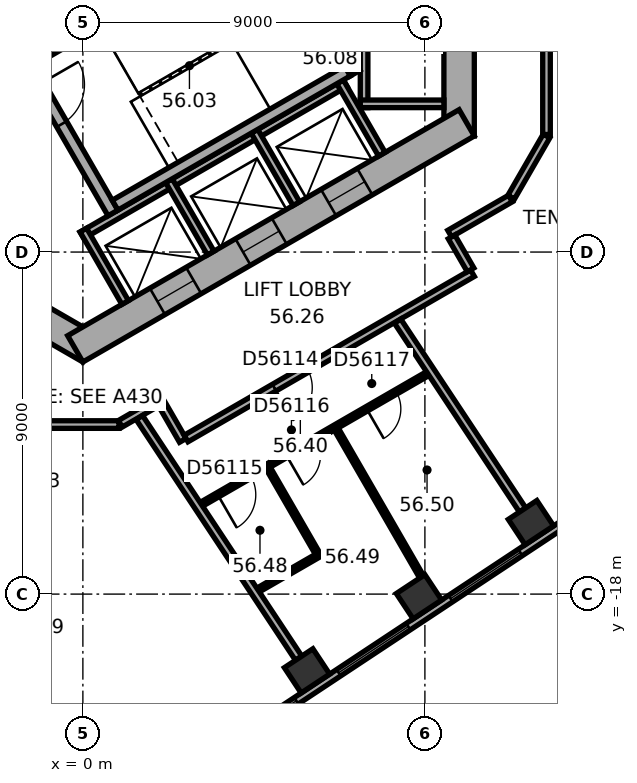
"""IFC4 building model, lengths in metres.
Left out: names, types, materials, properties, quantities, classifications, styles, units other than length and angle.
Written with IfcOpenShell. Run it as: python <this file> out.ifc"""

import sys

from ifc_helpers import new_model, si_unit, direction, frame, frame_2d, origin, origin_2d, place, context, subcontext, project, spatial, rectangle, extrude, element, fill, save


model = new_model("IFC4")
c1 = context("Model", 3, precision=1e-05, world=origin(), true_north=direction((0.0, 1.0)))
c2 = subcontext(c1, "Body", "Model", "MODEL_VIEW")
j1 = project(units=[si_unit("LENGTHUNIT", "METRE"), si_unit("PLANEANGLEUNIT", "RADIAN")], contexts=[c1])
p1 = place(None, origin())
s1 = spatial("IfcSite", under=j1, at=p1, CompositionType="ELEMENT")
p2 = place(p1, origin())
s2 = spatial("IfcBuilding", under=s1, at=p2, CompositionType="ELEMENT")
p3 = place(p2, frame((0.0, 0.0, 229.1)))
s3 = spatial("IfcBuildingStorey", under=s2, at=p3, CompositionType="ELEMENT", Elevation=229.1)
for number, where, z_axis, x_axis in (
    (1, (5.898, -20.021, 0.0), (0.0, 0.0, 1.0), (0.834, 0.552, 0.0)),
    (2, (8.844, -18.07, 0.0), (0.0, 0.0, 1.0), (0.834, 0.552, 0.0)),
    (3, (11.791, -16.12, 0.0), (0.0, 0.0, 1.0), (0.834, 0.552, 0.0)),
):
    element("IfcColumn", number, at=place(p3, frame(where, z_axis=z_axis, x_axis=x_axis)), inside=s3, PredefinedType="COLUMN", context=c2, shape_type="SweptSolid", body=[
        extrude(rectangle(XDim=0.9, YDim=0.8, at=origin_2d()), origin(), (0.0, 0.0, 1.0), 3.7),
    ])
p4 = place(p3, frame((9.9, -5.947, 0.0), z_axis=(0.0, 0.0, 1.0), x_axis=(0.0, 1.0, 0.0)))
e4 = element("IfcWall", 4, at=p4, inside=s3, PredefinedType="SHEAR", context=c2, shape_type="SweptSolid", body=[
    extrude(rectangle(XDim=11.894, YDim=0.8, at=frame_2d((5.947, 0.0))), origin(), (0.0, 0.0, 1.0), 3.7),
])
p5 = place(p4, frame((6.147, 0.0, 0.0)))
e5 = element("IfcOpeningElement", 5, at=p5, cuts=e4, PredefinedType="OPENING", context=c2, shape_type="SweptSolid", body=[
    extrude(rectangle(XDim=1.5, YDim=2.1, at=frame_2d((0.75, 1.05))), frame((0.0, 0.41, 0.0), z_axis=(0.0, -1.0, 0.0), x_axis=(1.0, 0.0, 0.0)), (0.0, 0.0, 1.0), 0.82),
])
p6 = place(p4, frame((2.997, 0.0, 0.0)))
e6 = element("IfcOpeningElement", 6, at=p6, cuts=e4, PredefinedType="OPENING", context=c2, shape_type="SweptSolid", body=[
    extrude(rectangle(XDim=0.9, YDim=2.1, at=frame_2d((0.45, 1.05))), frame((0.0, 0.41, 0.0), z_axis=(0.0, -1.0, 0.0), x_axis=(1.0, 0.0, 0.0)), (0.0, 0.0, 1.0), 0.82),
])
p7 = place(p3, frame((-10.1, -5.6, 0.0), z_axis=(0.0, 0.0, 1.0), x_axis=(0.866023897231, -0.500002609418, 0.0)))
e7 = element("IfcWall", 7, at=p7, inside=s3, PredefinedType="SHEAR", context=c2, shape_type="SweptSolid", body=[
    extrude(rectangle(XDim=11.894, YDim=0.8, at=frame_2d((5.947, 0.0))), origin(), (0.0, 0.0, 1.0), 3.7),
])
p8 = place(p7, frame((6.147, 0.0, 0.0)))
e8 = element("IfcOpeningElement", 8, at=p8, cuts=e7, PredefinedType="OPENING", context=c2, shape_type="SweptSolid", body=[
    extrude(rectangle(XDim=1.5, YDim=2.1, at=frame_2d((0.75, 1.05))), frame((0.0, 0.41, 0.0), z_axis=(0.0, -1.0, 0.0), x_axis=(1.0, 0.0, 0.0)), (0.0, 0.0, 1.0), 0.82),
])
p9 = place(p7, frame((1.597, 0.0, 0.0)))
e9 = element("IfcOpeningElement", 9, at=p9, cuts=e7, PredefinedType="OPENING", context=c2, shape_type="SweptSolid", body=[
    extrude(rectangle(XDim=1.1, YDim=2.1, at=frame_2d((0.55, 1.05))), frame((0.0, 0.41, 0.0), z_axis=(0.0, -1.0, 0.0), x_axis=(1.0, 0.0, 0.0)), (0.0, 0.0, 1.0), 0.82),
])
p10 = place(p7, frame((4.197, 0.0, 0.0)))
e10 = element("IfcOpeningElement", 10, at=p10, cuts=e7, PredefinedType="OPENING", context=c2, shape_type="SweptSolid", body=[
    extrude(rectangle(XDim=1.1, YDim=2.1, at=frame_2d((0.55, 1.05))), frame((0.0, 0.41, 0.0), z_axis=(0.0, -1.0, 0.0), x_axis=(1.0, 0.0, 0.0)), (0.0, 0.0, 1.0), 0.82),
])
p11 = place(p3, frame((-0.2, -11.547, 0.0), z_axis=(0.0, 0.0, 1.0), x_axis=(0.866023897231, 0.500002609418, 0.0)))
e11 = element("IfcWall", 11, at=p11, inside=s3, PredefinedType="SHEAR", context=c2, shape_type="SweptSolid", body=[
    extrude(rectangle(XDim=11.894, YDim=0.8, at=frame_2d((5.947, 0.0))), origin(), (0.0, 0.0, 1.0), 3.7),
])
p12 = place(p11, frame((2.497, 0.0, 0.0)))
e12 = element("IfcOpeningElement", 12, at=p12, cuts=e11, PredefinedType="OPENING", context=c2, shape_type="SweptSolid", body=[
    extrude(rectangle(XDim=1.1, YDim=2.1, at=frame_2d((0.55, 1.05))), frame((0.0, 0.41, 0.0), z_axis=(0.0, -1.0, 0.0), x_axis=(1.0, 0.0, 0.0)), (0.0, 0.0, 1.0), 0.82),
])
p13 = place(p11, frame((5.097, 0.0, 0.0)))
e13 = element("IfcOpeningElement", 13, at=p13, cuts=e11, PredefinedType="OPENING", context=c2, shape_type="SweptSolid", body=[
    extrude(rectangle(XDim=1.1, YDim=2.1, at=frame_2d((0.55, 1.05))), frame((0.0, 0.41, 0.0), z_axis=(0.0, -1.0, 0.0), x_axis=(1.0, 0.0, 0.0)), (0.0, 0.0, 1.0), 0.82),
])
p14 = place(p11, frame((7.697, 0.0, 0.0)))
e14 = element("IfcOpeningElement", 14, at=p14, cuts=e11, PredefinedType="OPENING", context=c2, shape_type="SweptSolid", body=[
    extrude(rectangle(XDim=1.1, YDim=2.1, at=frame_2d((0.55, 1.05))), frame((0.0, 0.41, 0.0), z_axis=(0.0, -1.0, 0.0), x_axis=(1.0, 0.0, 0.0)), (0.0, 0.0, 1.0), 0.82),
])
p15 = place(p3, frame((2.739, -22.711, 0.0), z_axis=(0.0, 0.0, 1.0), x_axis=(0.833885723098, 0.551937134838, 0.0)))
e15 = element("IfcWall", 15, at=p15, inside=s3, PredefinedType="STANDARD", context=c2, shape_type="SweptSolid", body=[
    extrude(rectangle(XDim=18.841, YDim=0.2, at=frame_2d((9.421, 0.0))), origin(), (0.0, 0.0, 1.0), 3.7),
])
p16 = place(p15, frame((1.252, 0.0, 0.9)))
e16 = element("IfcOpeningElement", 16, at=p16, cuts=e15, PredefinedType="OPENING", context=c2, shape_type="SweptSolid", body=[
    extrude(rectangle(XDim=2.2, YDim=2.0, at=frame_2d((1.1, 1.0))), frame((0.0, 0.11, 0.0), z_axis=(0.0, -1.0, 0.0), x_axis=(1.0, 0.0, 0.0)), (0.0, 0.0, 1.0), 0.22),
])
p17 = place(p15, frame((4.786, 0.0, 0.9)))
e17 = element("IfcOpeningElement", 17, at=p17, cuts=e15, PredefinedType="OPENING", context=c2, shape_type="SweptSolid", body=[
    extrude(rectangle(XDim=2.2, YDim=2.0, at=frame_2d((1.1, 1.0))), frame((0.0, 0.11, 0.0), z_axis=(0.0, -1.0, 0.0), x_axis=(1.0, 0.0, 0.0)), (0.0, 0.0, 1.0), 0.22),
])
p18 = place(p15, frame((8.32, 0.0, 0.9)))
e18 = element("IfcOpeningElement", 18, at=p18, cuts=e15, PredefinedType="OPENING", context=c2, shape_type="SweptSolid", body=[
    extrude(rectangle(XDim=2.2, YDim=2.0, at=frame_2d((1.1, 1.0))), frame((0.0, 0.11, 0.0), z_axis=(0.0, -1.0, 0.0), x_axis=(1.0, 0.0, 0.0)), (0.0, 0.0, 1.0), 0.22),
])
p19 = place(p15, frame((11.854, 0.0, 0.9)))
e19 = element("IfcOpeningElement", 19, at=p19, cuts=e15, PredefinedType="OPENING", context=c2, shape_type="SweptSolid", body=[
    extrude(rectangle(XDim=2.2, YDim=2.0, at=frame_2d((1.1, 1.0))), frame((0.0, 0.11, 0.0), z_axis=(0.0, -1.0, 0.0), x_axis=(1.0, 0.0, 0.0)), (0.0, 0.0, 1.0), 0.22),
])
p20 = place(p15, frame((15.387, 0.0, 0.9)))
e20 = element("IfcOpeningElement", 20, at=p20, cuts=e15, PredefinedType="OPENING", context=c2, shape_type="SweptSolid", body=[
    extrude(rectangle(XDim=2.2, YDim=2.0, at=frame_2d((1.1, 1.0))), frame((0.0, 0.11, 0.0), z_axis=(0.0, -1.0, 0.0), x_axis=(1.0, 0.0, 0.0)), (0.0, 0.0, 1.0), 0.22),
])
p21 = place(p3, frame((7.4, -5.2, 0.0), z_axis=(0.0, 0.0, 1.0), x_axis=(0.0, 1.0, 0.0)))
e21 = element("IfcWall", 21, at=p21, inside=s3, PredefinedType="PARTITIONING", context=c2, shape_type="SweptSolid", body=[
    extrude(rectangle(XDim=5.4, YDim=0.2, at=frame_2d((2.7, 0.0))), origin(), (0.0, 0.0, 1.0), 3.42),
])
p22 = place(p3, frame((7.3, -5.1, 0.0), z_axis=(0.0, 0.0, 1.0), x_axis=(1.0, 0.0, 0.0)))
e22 = element("IfcWall", 22, at=p22, inside=s3, PredefinedType="PARTITIONING", context=c2, shape_type="SweptSolid", body=[
    extrude(rectangle(XDim=2.2, YDim=0.2, at=frame_2d((1.1, 0.0))), origin(), (0.0, 0.0, 1.0), 3.42),
])
p23 = place(p3, frame((-0.024, -8.559, 0.0), z_axis=(0.0, 0.0, 1.0), x_axis=(0.866026010844, 0.49999894854, 0.0)))
e23 = element("IfcWall", 23, at=p23, inside=s3, PredefinedType="PARTITIONING", context=c2, shape_type="SweptSolid", body=[
    extrude(rectangle(XDim=8.0, YDim=0.2, at=frame_2d((4.0, 0.0))), origin(), (0.0, 0.0, 1.0), 3.42),
])
for number, where, z_axis, x_axis in (
    (24, (0.013, -8.422, 0.0), (0.0, 0.0, 1.0), (0.5, -0.866, 0.0)),
    (25, (2.264, -7.122, 0.0), (0.0, 0.0, 1.0), (0.5, -0.866, 0.0)),
    (26, (4.516, -5.822, 0.0), (0.0, 0.0, 1.0), (0.5, -0.866, 0.0)),
    (27, (6.768, -4.522, 0.0), (0.0, 0.0, 1.0), (0.5, -0.866, 0.0)),
):
    element("IfcWall", number, at=place(p3, frame(where, z_axis=z_axis, x_axis=x_axis)), inside=s3, PredefinedType="PARTITIONING", context=c2, shape_type="SweptSolid", body=[
        extrude(rectangle(XDim=2.2, YDim=0.2, at=frame_2d((1.1, 0.0))), origin(), (0.0, 0.0, 1.0), 3.42),
    ])
p24 = place(p3, frame((-1.558, -3.902, 0.0), z_axis=(0.0, 0.0, 1.0), x_axis=(0.499977259774, -0.866038532462, 0.0)))
e28 = element("IfcWall", 28, at=p24, inside=s3, PredefinedType="SHEAR", context=c2, shape_type="SweptSolid", body=[
    extrude(rectangle(XDim=4.7, YDim=0.3, at=frame_2d((2.35, 0.0))), origin(), (0.0, 0.0, 1.0), 3.42),
])
p25 = place(p24, frame((0.8, 0.0, 0.0)))
e29 = element("IfcOpeningElement", 29, at=p25, cuts=e28, PredefinedType="OPENING", context=c2, shape_type="SweptSolid", body=[
    extrude(rectangle(XDim=1.2, YDim=2.1, at=frame_2d((0.6, 1.05))), frame((0.0, 0.16, 0.0), z_axis=(0.0, -1.0, 0.0), x_axis=(1.0, 0.0, 0.0)), (0.0, 0.0, 1.0), 0.32),
])
p26 = place(p3, frame((4.816, -0.222, 0.0), z_axis=(0.0, 0.0, 1.0), x_axis=(0.499977259774, -0.866038532462, 0.0)))
e30 = element("IfcWall", 30, at=p26, inside=s3, PredefinedType="SHEAR", context=c2, shape_type="SweptSolid", body=[
    extrude(rectangle(XDim=4.7, YDim=0.3, at=frame_2d((2.35, 0.0))), origin(), (0.0, 0.0, 1.0), 3.42),
])
for number, where, z_axis, x_axis in (
    (31, (-1.353, -3.957, 0.0), (0.0, 0.0, 1.0), (0.866, 0.5, 0.0)),
    (32, (0.847, -7.767, 0.0), (0.0, 0.0, 1.0), (0.866, 0.5, 0.0)),
):
    element("IfcWall", number, at=place(p3, frame(where, z_axis=z_axis, x_axis=x_axis)), inside=s3, PredefinedType="SHEAR", context=c2, shape_type="SweptSolid", body=[
        extrude(rectangle(XDim=7.06, YDim=0.3, at=frame_2d((3.53, 0.0))), origin(), (0.0, 0.0, 1.0), 3.42),
    ])
p27 = place(p3, frame((-0.95, -13.539, 0.0), z_axis=(0.0, 0.0, 1.0), x_axis=(1.0, 0.0, 0.0)))
e33 = element("IfcWall", 33, at=p27, inside=s3, PredefinedType="PARTITIONING", context=c2, shape_type="SweptSolid", body=[
    extrude(rectangle(XDim=1.9, YDim=0.2, at=frame_2d((0.95, 0.0))), origin(), (0.0, 0.0, 1.0), 3.42),
])
p28 = place(p3, frame((0.985, -13.519, 0.0), z_axis=(0.0, 0.0, 1.0), x_axis=(0.866054082991, 0.499950322867, 0.0)))
e34 = element("IfcWall", 34, at=p28, inside=s3, PredefinedType="PARTITIONING", context=c2, shape_type="SweptSolid", body=[
    extrude(rectangle(XDim=1.206, YDim=0.2, at=frame_2d((0.603, 0.0))), origin(), (0.0, 0.0, 1.0), 3.42),
])
p29 = place(p3, frame((2.079, -13.003, 0.0), z_axis=(0.0, 0.0, 1.0), x_axis=(0.500074377092, -0.865982457891, 0.0)))
e35 = element("IfcWall", 35, at=p29, inside=s3, PredefinedType="PARTITIONING", context=c2, shape_type="SweptSolid", body=[
    extrude(rectangle(XDim=1.101, YDim=0.2, at=frame_2d((0.55, 0.0))), origin(), (0.0, 0.0, 1.0), 3.42),
])
p30 = place(p3, frame((2.716, -13.906, 0.0), z_axis=(0.0, 0.0, 1.0), x_axis=(0.866040290674, 0.499974214264, 0.0)))
e36 = element("IfcWall", 36, at=p30, inside=s3, PredefinedType="PARTITIONING", context=c2, shape_type="SweptSolid", body=[
    extrude(rectangle(XDim=8.702, YDim=0.2, at=frame_2d((4.351, 0.0))), origin(), (0.0, 0.0, 1.0), 3.42),
])
p31 = place(p30, frame((2.679, 0.0, 0.0)))
e37 = element("IfcOpeningElement", 37, at=p31, cuts=e36, PredefinedType="OPENING", context=c2, shape_type="SweptSolid", body=[
    extrude(rectangle(XDim=1.0, YDim=2.1, at=frame_2d((0.5, 1.05))), frame((0.0, 0.11, 0.0), z_axis=(0.0, -1.0, 0.0), x_axis=(1.0, 0.0, 0.0)), (0.0, 0.0, 1.0), 0.22),
])
p32 = place(p3, frame((3.117, -15.638, 0.0), z_axis=(0.0, 0.0, 1.0), x_axis=(0.866031365477, 0.499989673903, 0.0)))
e38 = element("IfcWall", 38, at=p32, inside=s3, PredefinedType="PARTITIONING", context=c2, shape_type="SweptSolid", body=[
    extrude(rectangle(XDim=6.881, YDim=0.12, at=frame_2d((3.44, 0.0))), origin(), (0.0, 0.0, 1.0), 3.42),
])
p33 = place(p32, frame((0.5, 0.0, 0.0)))
e39 = element("IfcOpeningElement", 39, at=p33, cuts=e38, PredefinedType="OPENING", context=c2, shape_type="SweptSolid", body=[
    extrude(rectangle(XDim=1.0, YDim=2.1, at=frame_2d((0.5, 1.05))), frame((0.0, 0.07, 0.0), z_axis=(0.0, -1.0, 0.0), x_axis=(1.0, 0.0, 0.0)), (0.0, 0.0, 1.0), 0.14),
])
p34 = place(p32, frame((2.583, 0.0, 0.0)))
e40 = element("IfcOpeningElement", 40, at=p34, cuts=e38, PredefinedType="OPENING", context=c2, shape_type="SweptSolid", body=[
    extrude(rectangle(XDim=0.9, YDim=2.1, at=frame_2d((0.45, 1.05))), frame((0.0, 0.07, 0.0), z_axis=(0.0, -1.0, 0.0), x_axis=(1.0, 0.0, 0.0)), (0.0, 0.0, 1.0), 0.14),
])
p35 = place(p32, frame((5.023, 0.0, 0.0)))
e41 = element("IfcOpeningElement", 41, at=p35, cuts=e38, PredefinedType="OPENING", context=c2, shape_type="SweptSolid", body=[
    extrude(rectangle(XDim=0.9, YDim=2.1, at=frame_2d((0.45, 1.05))), frame((0.0, 0.07, 0.0), z_axis=(0.0, -1.0, 0.0), x_axis=(1.0, 0.0, 0.0)), (0.0, 0.0, 1.0), 0.14),
])
p36 = place(p3, frame((4.61, -17.893, 0.0), z_axis=(0.0, 0.0, 1.0), x_axis=(0.866023842607, 0.500002704028, 0.0)))
e42 = element("IfcWall", 42, at=p36, inside=s3, PredefinedType="PARTITIONING", context=c2, shape_type="SweptSolid", body=[
    extrude(rectangle(XDim=1.835, YDim=0.12, at=frame_2d((0.917, 0.0))), origin(), (0.0, 0.0, 1.0), 3.42),
])
p37 = place(p3, frame((5.677, -19.687, 0.0), z_axis=(0.0, 0.0, 1.0), x_axis=(-0.551936619203, 0.833886064389, 0.0)))
e43 = element("IfcWall", 43, at=p37, inside=s3, PredefinedType="PARTITIONING", context=c2, shape_type="SweptSolid", body=[
    extrude(rectangle(XDim=7.592, YDim=0.2, at=frame_2d((3.796, 0.0))), origin(), (0.0, 0.0, 1.0), 3.42),
])
p38 = place(p3, frame((6.169, -16.924, 0.0), z_axis=(0.0, 0.0, 1.0), x_axis=(-0.500047388771, 0.865998042136, 0.0)))
e44 = element("IfcWall", 44, at=p38, inside=s3, PredefinedType="PARTITIONING", context=c2, shape_type="SweptSolid", body=[
    extrude(rectangle(XDim=2.58, YDim=0.12, at=frame_2d((1.29, 0.0))), origin(), (0.0, 0.0, 1.0), 3.42),
])
p39 = place(p3, frame((8.912, -17.545, 0.0), z_axis=(0.0, 0.0, 1.0), x_axis=(-0.500022113525, 0.866012636158, 0.0)))
e45 = element("IfcWall", 45, at=p39, inside=s3, PredefinedType="PARTITIONING", context=c2, shape_type="SweptSolid", body=[
    extrude(rectangle(XDim=4.49, YDim=0.12, at=frame_2d((2.245, 0.0))), origin(), (0.0, 0.0, 1.0), 2.87),
])
p40 = place(p3, frame((9.652, -8.515, 0.0), z_axis=(0.0, 0.0, 1.0), x_axis=(0.866020375458, 0.500008709215, 0.0)))
e46 = element("IfcWall", 46, at=p40, inside=s3, PredefinedType="PARTITIONING", context=c2, shape_type="SweptSolid", body=[
    extrude(rectangle(XDim=1.846, YDim=0.2, at=frame_2d((0.923, 0.0))), origin(), (0.0, 0.0, 1.0), 3.42),
])
p41 = place(p3, frame((10.202, -9.469, 0.0), z_axis=(0.0, 0.0, 1.0), x_axis=(-0.499968756647, 0.866043441391, 0.0)))
e47 = element("IfcWall", 47, at=p41, inside=s3, PredefinedType="PARTITIONING", context=c2, shape_type="SweptSolid", body=[
    extrude(rectangle(XDim=1.001, YDim=0.2, at=frame_2d((0.5, 0.0))), origin(), (0.0, 0.0, 1.0), 3.42),
])
p42 = place(p3, frame((11.27, -7.558, 0.0), z_axis=(0.0, 0.0, 1.0), x_axis=(0.499964847546, 0.866045698112, 0.0)))
e48 = element("IfcWall", 48, at=p42, inside=s3, PredefinedType="PARTITIONING", context=c2, shape_type="SweptSolid", body=[
    extrude(rectangle(XDim=1.86, YDim=0.2, at=frame_2d((0.93, 0.0))), origin(), (0.0, 0.0, 1.0), 3.42),
])
p43 = place(p3, frame((11.571, -15.786, 0.0), z_axis=(0.0, 0.0, 1.0), x_axis=(-0.551944861763, 0.833880608705, 0.0)))
e49 = element("IfcWall", 49, at=p43, inside=s3, PredefinedType="PARTITIONING", context=c2, shape_type="SweptSolid", body=[
    extrude(rectangle(XDim=5.957, YDim=0.2, at=frame_2d((2.979, 0.0))), origin(), (0.0, 0.0, 1.0), 3.42),
])
p44 = place(p3, frame((12.2, -5.907, 0.0), z_axis=(0.0, 0.0, 1.0), x_axis=(0.0, 1.0, 0.0)))
e50 = element("IfcWall", 50, at=p44, inside=s3, PredefinedType="PARTITIONING", context=c2, shape_type="SweptSolid", body=[
    extrude(rectangle(XDim=4.971, YDim=0.2, at=frame_2d((2.486, 0.0))), origin(), (0.0, 0.0, 1.0), 3.42),
])
p45 = place(p16, origin())
e51 = element("IfcWindow", 51, at=p45, inside=s3, PartitioningType="SINGLE_PANEL", PredefinedType="WINDOW", context=c2, shape_type="SweptSolid", body=[
    extrude(rectangle(XDim=2.2, YDim=2.0, at=frame_2d((1.1, 1.0))), frame((0.0, 0.03, 0.0), z_axis=(0.0, -1.0, 0.0), x_axis=(1.0, 0.0, 0.0)), (0.0, 0.0, 1.0), 0.06),
])
fill(e16, e51)
p46 = place(p17, origin())
e52 = element("IfcWindow", 52, at=p46, inside=s3, PartitioningType="SINGLE_PANEL", PredefinedType="WINDOW", context=c2, shape_type="SweptSolid", body=[
    extrude(rectangle(XDim=2.2, YDim=2.0, at=frame_2d((1.1, 1.0))), frame((0.0, 0.03, 0.0), z_axis=(0.0, -1.0, 0.0), x_axis=(1.0, 0.0, 0.0)), (0.0, 0.0, 1.0), 0.06),
])
fill(e17, e52)
p47 = place(p18, origin())
e53 = element("IfcWindow", 53, at=p47, inside=s3, PartitioningType="SINGLE_PANEL", PredefinedType="WINDOW", context=c2, shape_type="SweptSolid", body=[
    extrude(rectangle(XDim=2.2, YDim=2.0, at=frame_2d((1.1, 1.0))), frame((0.0, 0.03, 0.0), z_axis=(0.0, -1.0, 0.0), x_axis=(1.0, 0.0, 0.0)), (0.0, 0.0, 1.0), 0.06),
])
fill(e18, e53)
p48 = place(p25, origin())
e54 = element("IfcDoor", 54, at=p48, inside=s3, OperationType="SINGLE_SWING_RIGHT", PredefinedType="DOOR", context=c2, shape_type="SweptSolid", body=[
    extrude(rectangle(XDim=1.2, YDim=2.1, at=frame_2d((0.6, 1.05))), frame((0.0, 0.025, 0.0), z_axis=(0.0, -1.0, 0.0), x_axis=(1.0, 0.0, 0.0)), (0.0, 0.0, 1.0), 0.05),
])
fill(e29, e54)
p49 = place(p12, origin())
e55 = element("IfcDoor", 55, at=p49, inside=s3, OperationType="DOUBLE_DOOR_SLIDING", PredefinedType="DOOR", context=c2, shape_type="SweptSolid", body=[
    extrude(rectangle(XDim=1.1, YDim=2.1, at=frame_2d((0.55, 1.05))), frame((0.0, 0.025, 0.0), z_axis=(0.0, -1.0, 0.0), x_axis=(1.0, 0.0, 0.0)), (0.0, 0.0, 1.0), 0.05),
])
fill(e12, e55)
p50 = place(p13, origin())
e56 = element("IfcDoor", 56, at=p50, inside=s3, OperationType="DOUBLE_DOOR_SLIDING", PredefinedType="DOOR", context=c2, shape_type="SweptSolid", body=[
    extrude(rectangle(XDim=1.1, YDim=2.1, at=frame_2d((0.55, 1.05))), frame((0.0, 0.025, 0.0), z_axis=(0.0, -1.0, 0.0), x_axis=(1.0, 0.0, 0.0)), (0.0, 0.0, 1.0), 0.05),
])
fill(e13, e56)
p51 = place(p14, origin())
e57 = element("IfcDoor", 57, at=p51, inside=s3, OperationType="DOUBLE_DOOR_SLIDING", PredefinedType="DOOR", context=c2, shape_type="SweptSolid", body=[
    extrude(rectangle(XDim=1.1, YDim=2.1, at=frame_2d((0.55, 1.05))), frame((0.0, 0.025, 0.0), z_axis=(0.0, -1.0, 0.0), x_axis=(1.0, 0.0, 0.0)), (0.0, 0.0, 1.0), 0.05),
])
fill(e14, e57)
p52 = place(p31, origin())
e58 = element("IfcDoor", 58, at=p52, inside=s3, OperationType="SINGLE_SWING_LEFT", PredefinedType="DOOR", context=c2, shape_type="SweptSolid", body=[
    extrude(rectangle(XDim=1.0, YDim=2.1, at=frame_2d((0.5, 1.05))), frame((0.0, 0.025, 0.0), z_axis=(0.0, -1.0, 0.0), x_axis=(1.0, 0.0, 0.0)), (0.0, 0.0, 1.0), 0.05),
])
fill(e37, e58)
p53 = place(p33, origin())
e59 = element("IfcDoor", 59, at=p53, inside=s3, OperationType="SINGLE_SWING_LEFT", PredefinedType="DOOR", context=c2, shape_type="SweptSolid", body=[
    extrude(rectangle(XDim=1.0, YDim=2.1, at=frame_2d((0.5, 1.05))), frame((0.0, 0.025, 0.0), z_axis=(0.0, -1.0, 0.0), x_axis=(1.0, 0.0, 0.0)), (0.0, 0.0, 1.0), 0.05),
])
fill(e39, e59)
p54 = place(p34, origin())
e60 = element("IfcDoor", 60, at=p54, inside=s3, OperationType="SINGLE_SWING_LEFT", PredefinedType="DOOR", context=c2, shape_type="SweptSolid", body=[
    extrude(rectangle(XDim=0.9, YDim=2.1, at=frame_2d((0.45, 1.05))), frame((0.0, 0.025, 0.0), z_axis=(0.0, -1.0, 0.0), x_axis=(1.0, 0.0, 0.0)), (0.0, 0.0, 1.0), 0.05),
])
fill(e40, e60)
p55 = place(p35, origin())
e61 = element("IfcDoor", 61, at=p55, inside=s3, OperationType="SINGLE_SWING_LEFT", PredefinedType="DOOR", context=c2, shape_type="SweptSolid", body=[
    extrude(rectangle(XDim=0.9, YDim=2.1, at=frame_2d((0.45, 1.05))), frame((0.0, 0.025, 0.0), z_axis=(0.0, -1.0, 0.0), x_axis=(1.0, 0.0, 0.0)), (0.0, 0.0, 1.0), 0.05),
])
fill(e41, e61)
save(model, sys.argv[1])
